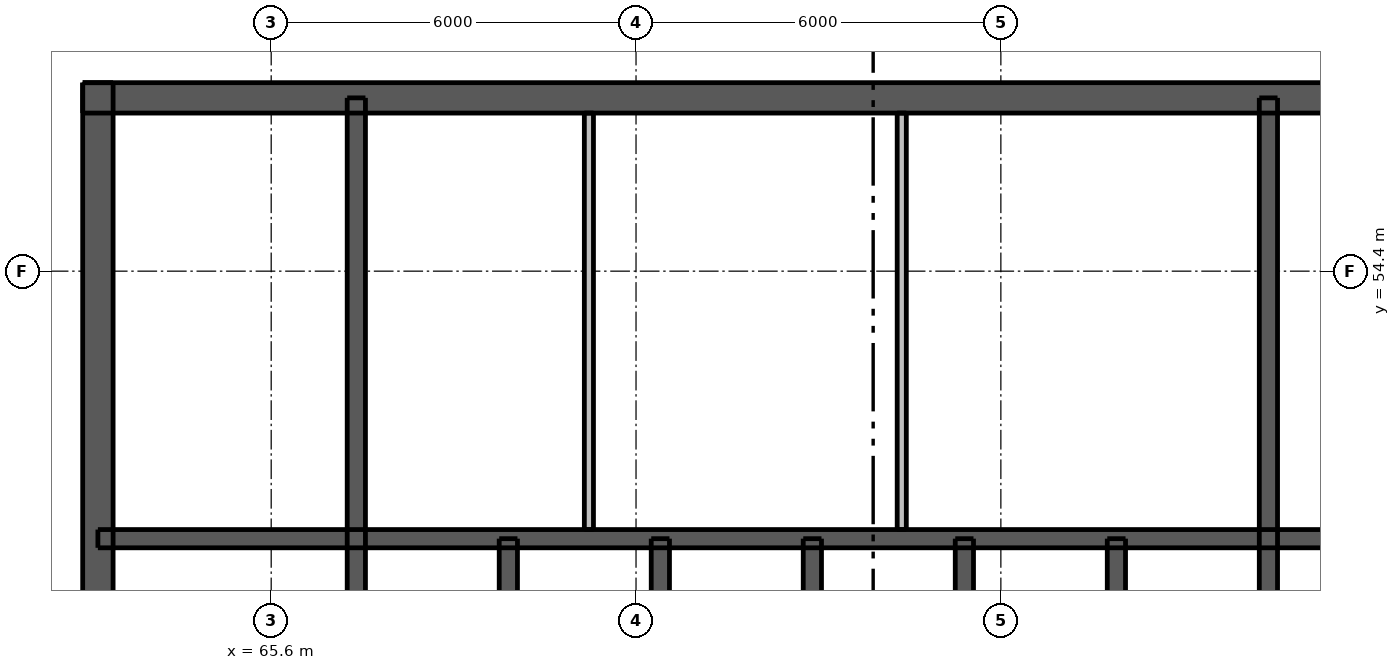
"""IFC4 building model, lengths in metres.
Left out: names, types, materials, properties, quantities, classifications, styles, units other than length and angle.
Written with IfcOpenShell. Run it as: python <this file> out.ifc"""

import sys

from ifc_helpers import new_model, si_unit, direction, frame, frame_2d, origin, place, context, subcontext, project, spatial, rectangle, extrude, element, fill, save


model = new_model("IFC4")
c1 = context("Model", 3, precision=1e-05, world=origin(), true_north=direction((0.0, 1.0)))
c2 = subcontext(c1, "Body", "Model", "MODEL_VIEW")
j1 = project(units=[si_unit("LENGTHUNIT", "METRE"), si_unit("PLANEANGLEUNIT", "RADIAN")], contexts=[c1])
p1 = place(None, origin())
s1 = spatial("IfcSite", under=j1, at=p1, CompositionType="ELEMENT")
p2 = place(p1, origin())
s2 = spatial("IfcBuilding", under=s1, at=p2, CompositionType="ELEMENT")
p3 = place(p2, frame((0.0, 0.0, 252.1)))
s3 = spatial("IfcBuildingStorey", under=s2, at=p3, CompositionType="ELEMENT", Elevation=252.1)
p4 = place(p3, frame((62.5, 57.25, 0.0), z_axis=(0.0, 0.0, 1.0), x_axis=(1.0, 0.0, 0.0)))
e1 = element("IfcWall", 1, at=p4, inside=s3, PredefinedType="SHEAR", context=c2, shape_type="SweptSolid", body=[
    extrude(rectangle(XDim=24.0, YDim=0.5, at=frame_2d((12.0, 0.0))), origin(), (0.0, 0.0, 1.0), 3.05),
])
p5 = place(p4, frame((21.025, 0.0, 0.0)))
e2 = element("IfcOpeningElement", 2, at=p5, cuts=e1, PredefinedType="OPENING", context=c2, shape_type="SweptSolid", body=[
    extrude(rectangle(XDim=1.1, YDim=2.1, at=frame_2d((0.55, 1.05))), frame((0.0, 0.26, 0.0), z_axis=(0.0, -1.0, 0.0), x_axis=(1.0, 0.0, 0.0)), (0.0, 0.0, 1.0), 0.52),
])
p6 = place(p4, frame((1.875, 0.0, 0.0)))
e3 = element("IfcOpeningElement", 3, at=p6, cuts=e1, PredefinedType="OPENING", context=c2, shape_type="SweptSolid", body=[
    extrude(rectangle(XDim=1.1, YDim=2.1, at=frame_2d((0.55, 1.05))), frame((0.0, 0.26, 0.0), z_axis=(0.0, -1.0, 0.0), x_axis=(1.0, 0.0, 0.0)), (0.0, 0.0, 1.0), 0.52),
])
p7 = place(p4, frame((6.038, 0.0, 0.0)))
e4 = element("IfcOpeningElement", 4, at=p7, cuts=e1, PredefinedType="OPENING", context=c2, shape_type="SweptSolid", body=[
    extrude(rectangle(XDim=0.9, YDim=2.1, at=frame_2d((0.45, 1.05))), frame((0.0, 0.26, 0.0), z_axis=(0.0, -1.0, 0.0), x_axis=(1.0, 0.0, 0.0)), (0.0, 0.0, 1.0), 0.52),
])
p8 = place(p4, frame((10.448, 0.0, 0.0)))
e5 = element("IfcOpeningElement", 5, at=p8, cuts=e1, PredefinedType="OPENING", context=c2, shape_type="SweptSolid", body=[
    extrude(rectangle(XDim=0.9, YDim=2.1, at=frame_2d((0.45, 1.05))), frame((0.0, 0.26, 0.0), z_axis=(0.0, -1.0, 0.0), x_axis=(1.0, 0.0, 0.0)), (0.0, 0.0, 1.0), 0.52),
])
p9 = place(p4, frame((15.96, 0.0, 0.0)))
e6 = element("IfcOpeningElement", 6, at=p9, cuts=e1, PredefinedType="OPENING", context=c2, shape_type="SweptSolid", body=[
    extrude(rectangle(XDim=0.9, YDim=2.1, at=frame_2d((0.45, 1.05))), frame((0.0, 0.26, 0.0), z_axis=(0.0, -1.0, 0.0), x_axis=(1.0, 0.0, 0.0)), (0.0, 0.0, 1.0), 0.52),
])
p10 = place(p3, frame((62.75, 33.5, 0.0), z_axis=(0.0, 0.0, 1.0), x_axis=(0.0, 1.0, 0.0)))
e7 = element("IfcWall", 7, at=p10, inside=s3, PredefinedType="SHEAR", context=c2, shape_type="SweptSolid", body=[
    extrude(rectangle(XDim=24.0, YDim=0.5, at=frame_2d((12.0, 0.0))), origin(), (0.0, 0.0, 1.0), 3.05),
])
p11 = place(p10, frame((11.2, 0.0, 0.0)))
e8 = element("IfcOpeningElement", 8, at=p11, cuts=e7, PredefinedType="OPENING", context=c2, shape_type="SweptSolid", body=[
    extrude(rectangle(XDim=1.6, YDim=2.1, at=frame_2d((0.8, 1.05))), frame((0.0, 0.26, 0.0), z_axis=(0.0, -1.0, 0.0), x_axis=(1.0, 0.0, 0.0)), (0.0, 0.0, 1.0), 0.52),
])
p12 = place(p3, frame((62.75, 50.0, 0.0), z_axis=(0.0, 0.0, 1.0), x_axis=(1.0, 0.0, 0.0)))
e9 = element("IfcWall", 9, at=p12, inside=s3, PredefinedType="SHEAR", context=c2, shape_type="SweptSolid", body=[
    extrude(rectangle(XDim=23.5, YDim=0.3, at=frame_2d((11.75, 0.0))), origin(), (0.0, 0.0, 1.0), 3.05),
])
for number, where, z_axis, x_axis in (
    (10, (67.0, 47.1, 0.0), (0.0, 0.0, 1.0), (0.0, 1.0, 0.0)),
    (11, (82.0, 47.1, 0.0), (0.0, 0.0, 1.0), (0.0, 1.0, 0.0)),
):
    element("IfcWall", number, at=place(p3, frame(where, z_axis=z_axis, x_axis=x_axis)), inside=s3, PredefinedType="SHEAR", context=c2, shape_type="SweptSolid", body=[
        extrude(rectangle(XDim=10.15, YDim=0.3, at=frame_2d((5.075, 0.0))), origin(), (0.0, 0.0, 1.0), 3.05),
    ])
for number, where, z_axis, x_axis in (
    (12, (69.5, 47.1, 0.0), (0.0, 0.0, 1.0), (0.0, 1.0, 0.0)),
    (13, (72.0, 47.1, 0.0), (0.0, 0.0, 1.0), (0.0, 1.0, 0.0)),
    (14, (74.5, 47.1, 0.0), (0.0, 0.0, 1.0), (0.0, 1.0, 0.0)),
    (15, (77.0, 47.1, 0.0), (0.0, 0.0, 1.0), (0.0, 1.0, 0.0)),
    (16, (79.5, 47.1, 0.0), (0.0, 0.0, 1.0), (0.0, 1.0, 0.0)),
):
    element("IfcWall", number, at=place(p3, frame(where, z_axis=z_axis, x_axis=x_axis)), inside=s3, PredefinedType="SHEAR", context=c2, shape_type="SweptSolid", body=[
        extrude(rectangle(XDim=2.9, YDim=0.3, at=frame_2d((1.45, 0.0))), origin(), (0.0, 0.0, 1.0), 3.05),
    ])
for number, where, z_axis, x_axis in (
    (17, (70.825, 50.15, 0.0), (0.0, 0.0, 1.0), (0.0, 1.0, 0.0)),
    (18, (75.97, 50.15, 0.0), (0.0, 0.0, 1.0), (0.0, 1.0, 0.0)),
):
    element("IfcWall", number, at=place(p3, frame(where, z_axis=z_axis, x_axis=x_axis)), inside=s3, PredefinedType="PLUMBINGWALL", context=c2, shape_type="SweptSolid", body=[
        extrude(rectangle(XDim=6.85, YDim=0.15, at=frame_2d((3.425, 0.0))), origin(), (0.0, 0.0, 1.0), 3.05),
    ])
p13 = place(p6, origin())
e19 = element("IfcDoor", 19, at=p13, inside=s3, OperationType="SINGLE_SWING_LEFT", PredefinedType="DOOR", context=c2, shape_type="SweptSolid", body=[
    extrude(rectangle(XDim=1.1, YDim=2.1, at=frame_2d((0.55, 1.05))), frame((0.0, -0.188, 0.0), z_axis=(0.0, -1.0, 0.0), x_axis=(1.0, 0.0, 0.0)), (0.0, 0.0, 1.0), 0.05),
])
fill(e3, e19)
p14 = place(p7, origin())
e20 = element("IfcDoor", 20, at=p14, inside=s3, OperationType="SINGLE_SWING_RIGHT", PredefinedType="DOOR", context=c2, shape_type="SweptSolid", body=[
    extrude(rectangle(XDim=0.9, YDim=2.1, at=frame_2d((0.45, 1.05))), frame((0.0, -0.188, 0.0), z_axis=(0.0, -1.0, 0.0), x_axis=(1.0, 0.0, 0.0)), (0.0, 0.0, 1.0), 0.05),
])
fill(e4, e20)
p15 = place(p8, origin())
e21 = element("IfcDoor", 21, at=p15, inside=s3, OperationType="SINGLE_SWING_RIGHT", PredefinedType="DOOR", context=c2, shape_type="SweptSolid", body=[
    extrude(rectangle(XDim=0.9, YDim=2.1, at=frame_2d((0.45, 1.05))), frame((0.0, -0.188, 0.0), z_axis=(0.0, -1.0, 0.0), x_axis=(1.0, 0.0, 0.0)), (0.0, 0.0, 1.0), 0.05),
])
fill(e5, e21)
p16 = place(p9, origin())
e22 = element("IfcDoor", 22, at=p16, inside=s3, OperationType="SINGLE_SWING_RIGHT", PredefinedType="DOOR", context=c2, shape_type="SweptSolid", body=[
    extrude(rectangle(XDim=0.9, YDim=2.1, at=frame_2d((0.45, 1.05))), frame((0.0, -0.188, 0.0), z_axis=(0.0, -1.0, 0.0), x_axis=(1.0, 0.0, 0.0)), (0.0, 0.0, 1.0), 0.05),
])
fill(e6, e22)
save(model, sys.argv[1])
